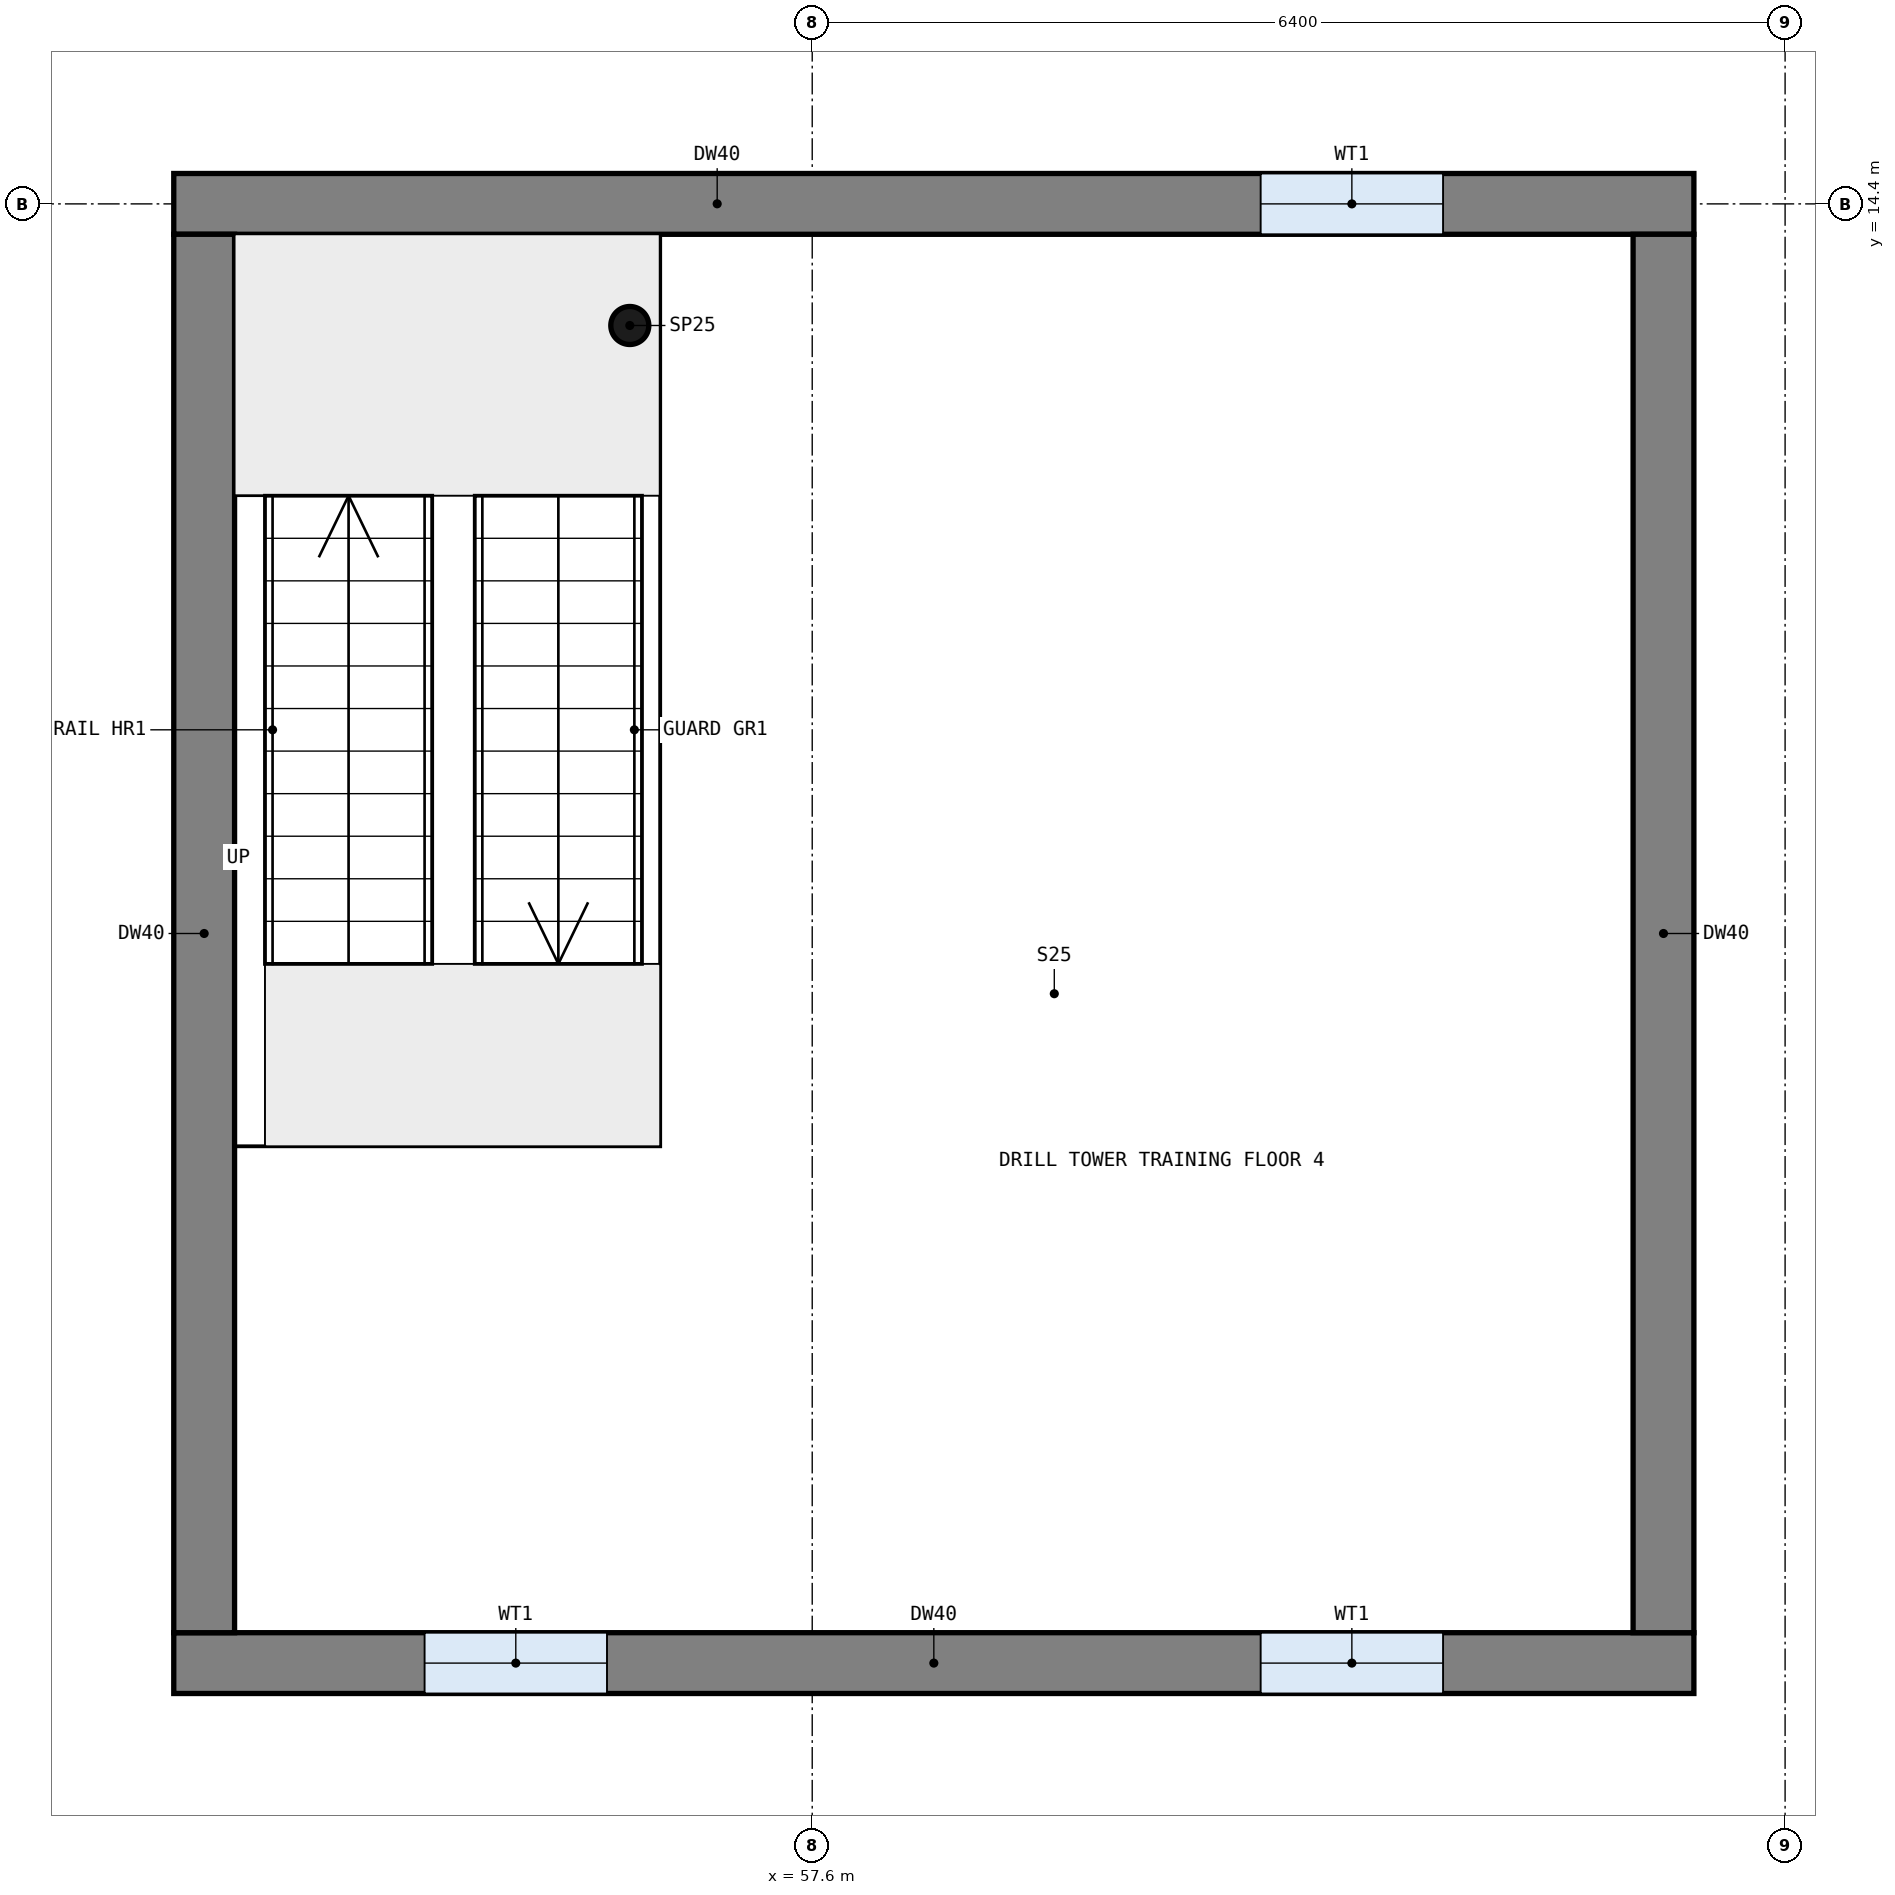
"""IFC4 building model, lengths in metres.
Left out: names, types, materials, properties, quantities, classifications, styles, units other than length and angle.
Written with IfcOpenShell. Run it as: python <this file> out.ifc"""

import sys

from ifc_helpers import new_model, si_unit, direction, frame, frame_2d, origin, origin_2d, place, context, subcontext, project, spatial, rectangle, circle, extrude, element, fill, save


model = new_model("IFC4")
c1 = context("Model", 3, precision=1e-05, world=origin(), true_north=direction((0.0, 1.0)))
c2 = subcontext(c1, "Body", "Model", "MODEL_VIEW")
j1 = project(units=[si_unit("LENGTHUNIT", "METRE"), si_unit("PLANEANGLEUNIT", "RADIAN")], contexts=[c1])
p1 = place(None, origin())
s1 = spatial("IfcSite", under=j1, at=p1, CompositionType="ELEMENT")
p2 = place(p1, origin())
s2 = spatial("IfcBuilding", under=s1, at=p2, CompositionType="ELEMENT")
p3 = place(p2, frame((0.0, 0.0, 12.9)))
s3 = spatial("IfcBuildingStorey", under=s2, at=p3, CompositionType="ELEMENT", Elevation=12.9)
p4 = place(p3, frame((53.4, 14.4, 0.0), z_axis=(0.0, 0.0, 1.0), x_axis=(1.0, 0.0, 0.0)))
e1 = element("IfcWall", 1, at=p4, inside=s3, PredefinedType="SHEAR", context=c2, shape_type="SweptSolid", body=[
    extrude(rectangle(XDim=10.0, YDim=0.4, at=frame_2d((5.0, 0.0))), origin(), (0.0, 0.0, 1.0), 4.2),
])
p5 = place(p4, frame((7.15, 0.0, 1.1)))
e2 = element("IfcOpeningElement", 2, at=p5, cuts=e1, PredefinedType="OPENING", context=c2, shape_type="SweptSolid", body=[
    extrude(rectangle(XDim=1.2, YDim=1.5, at=frame_2d((0.6, 0.75))), frame((0.0, 0.21, 0.0), z_axis=(0.0, -1.0, 0.0), x_axis=(1.0, 0.0, 0.0)), (0.0, 0.0, 1.0), 0.42),
])
p6 = place(p3, frame((53.4, 4.8, 0.0), z_axis=(0.0, 0.0, 1.0), x_axis=(1.0, 0.0, 0.0)))
e3 = element("IfcWall", 3, at=p6, inside=s3, PredefinedType="SHEAR", context=c2, shape_type="SweptSolid", body=[
    extrude(rectangle(XDim=10.0, YDim=0.4, at=frame_2d((5.0, 0.0))), origin(), (0.0, 0.0, 1.0), 4.2),
])
p7 = place(p6, frame((1.65, 0.0, 1.1)))
e4 = element("IfcOpeningElement", 4, at=p7, cuts=e3, PredefinedType="OPENING", context=c2, shape_type="SweptSolid", body=[
    extrude(rectangle(XDim=1.2, YDim=1.5, at=frame_2d((0.6, 0.75))), frame((0.0, 0.21, 0.0), z_axis=(0.0, -1.0, 0.0), x_axis=(1.0, 0.0, 0.0)), (0.0, 0.0, 1.0), 0.42),
])
p8 = place(p6, frame((7.15, 0.0, 1.1)))
e5 = element("IfcOpeningElement", 5, at=p8, cuts=e3, PredefinedType="OPENING", context=c2, shape_type="SweptSolid", body=[
    extrude(rectangle(XDim=1.2, YDim=1.5, at=frame_2d((0.6, 0.75))), frame((0.0, 0.21, 0.0), z_axis=(0.0, -1.0, 0.0), x_axis=(1.0, 0.0, 0.0)), (0.0, 0.0, 1.0), 0.42),
])
for number, where, z_axis, x_axis in (
    (6, (63.2, 5.0, 0.0), (0.0, 0.0, 1.0), (0.0, 1.0, 0.0)),
    (7, (53.6, 5.0, 0.0), (0.0, 0.0, 1.0), (0.0, 1.0, 0.0)),
):
    element("IfcWall", number, at=place(p3, frame(where, z_axis=z_axis, x_axis=x_axis)), inside=s3, PredefinedType="SHEAR", context=c2, shape_type="SweptSolid", body=[
        extrude(rectangle(XDim=9.2, YDim=0.4, at=frame_2d((4.6, 0.0))), origin(), (0.0, 0.0, 1.0), 4.2),
    ])
p9 = place(p3, frame((56.4, 13.6, 0.0), z_axis=(0.0, 0.0, 1.0), x_axis=(1.0, 0.0, 0.0)))
e8 = element("IfcColumn", 8, at=p9, inside=s3, PredefinedType="COLUMN", context=c2, shape_type="SweptSolid", body=[
    extrude(circle(Radius=0.125, at=origin_2d()), origin(), (0.0, 0.0, 1.0), 4.2),
])
p10 = place(p7, origin())
e9 = element("IfcWindow", 9, at=p10, inside=s3, PartitioningType="SINGLE_PANEL", PredefinedType="WINDOW", context=c2, shape_type="SweptSolid", body=[
    extrude(rectangle(XDim=1.2, YDim=1.5, at=frame_2d((0.6, 0.75))), frame((0.0, 0.03, 0.0), z_axis=(0.0, -1.0, 0.0), x_axis=(1.0, 0.0, 0.0)), (0.0, 0.0, 1.0), 0.06),
])
fill(e4, e9)
p11 = place(p8, origin())
e10 = element("IfcWindow", 10, at=p11, inside=s3, PartitioningType="SINGLE_PANEL", PredefinedType="WINDOW", context=c2, shape_type="SweptSolid", body=[
    extrude(rectangle(XDim=1.2, YDim=1.5, at=frame_2d((0.6, 0.75))), frame((0.0, 0.03, 0.0), z_axis=(0.0, -1.0, 0.0), x_axis=(1.0, 0.0, 0.0)), (0.0, 0.0, 1.0), 0.06),
])
fill(e5, e10)
p12 = place(p5, origin())
e11 = element("IfcWindow", 11, at=p12, inside=s3, PartitioningType="SINGLE_PANEL", PredefinedType="WINDOW", context=c2, shape_type="SweptSolid", body=[
    extrude(rectangle(XDim=1.2, YDim=1.5, at=frame_2d((0.6, 0.75))), frame((0.0, 0.03, 0.0), z_axis=(0.0, -1.0, 0.0), x_axis=(1.0, 0.0, 0.0)), (0.0, 0.0, 1.0), 0.06),
])
fill(e2, e11)
save(model, sys.argv[1])
